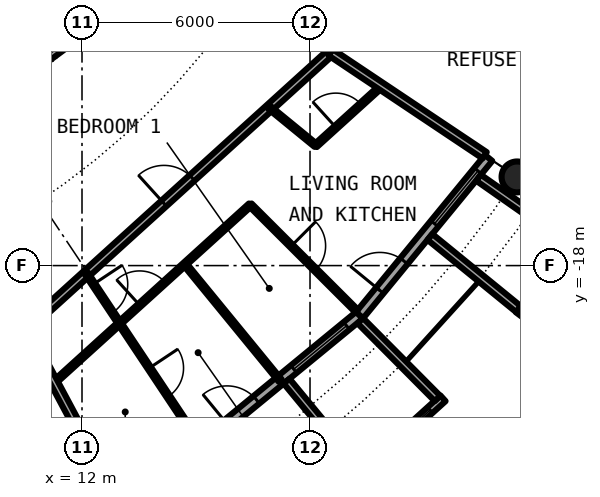
"""IFC4 building model, lengths in metres.
Left out: names, types, materials, properties, quantities, classifications, styles, units other than length and angle.
Written with IfcOpenShell. Run it as: python <this file> out.ifc"""

import sys

from ifc_helpers import new_model, si_unit, direction, frame, frame_2d, origin, origin_2d, place, context, subcontext, project, spatial, rectangle, circle, hollow_circle, extrude, element, fill, save


model = new_model("IFC4")
c1 = context("Model", 3, precision=1e-05, world=origin(), true_north=direction((0.0, 1.0)))
c2 = subcontext(c1, "Body", "Model", "MODEL_VIEW")
j1 = project(units=[si_unit("LENGTHUNIT", "METRE"), si_unit("PLANEANGLEUNIT", "RADIAN")], contexts=[c1])
p1 = place(None, origin())
s1 = spatial("IfcSite", under=j1, at=p1, CompositionType="ELEMENT")
p2 = place(p1, origin())
s2 = spatial("IfcBuilding", under=s1, at=p2, CompositionType="ELEMENT")
p3 = place(p2, frame((0.0, 0.0, 190.2)))
s3 = spatial("IfcBuildingStorey", under=s2, at=p3, CompositionType="ELEMENT", Elevation=190.2)
p4 = place(p3, frame((23.448, -15.667, 0.0), z_axis=(0.0, 0.0, 1.0), x_axis=(1.0, 0.0, 0.0)))
e1 = element("IfcColumn", 1, at=p4, inside=s3, PredefinedType="COLUMN", context=c2, shape_type="SweptSolid", body=[
    extrude(hollow_circle(Radius=0.406, WallThickness=0.03, at=origin_2d()), origin(), (0.0, 0.0, 1.0), 3.05),
])
p5 = place(p3, frame((15.167, -22.699, 0.0), z_axis=(0.0, 0.0, 1.0), x_axis=(0.773019449054, 0.634382322723, 0.0)))
e2 = element("IfcWall", 2, at=p5, inside=s3, PredefinedType="SOLIDWALL", context=c2, shape_type="SweptSolid", body=[
    extrude(rectangle(XDim=5.352, YDim=0.25, at=frame_2d((2.676, 0.0))), origin(), (0.0, 0.0, 1.0), 2.7),
])
p6 = place(p5, frame((0.841, 0.0, 0.0)))
e3 = element("IfcOpeningElement", 3, at=p6, cuts=e2, PredefinedType="OPENING", context=c2, shape_type="SweptSolid", body=[
    extrude(rectangle(XDim=1.0, YDim=2.2, at=frame_2d((0.5, 1.1))), frame((0.0, 0.135, 0.0), z_axis=(0.0, -1.0, 0.0), x_axis=(1.0, 0.0, 0.0)), (0.0, 0.0, 1.0), 0.27),
])
p7 = place(p5, frame((3.111, 0.0, 0.3)))
e4 = element("IfcOpeningElement", 4, at=p7, cuts=e2, PredefinedType="OPENING", context=c2, shape_type="SweptSolid", body=[
    extrude(rectangle(XDim=1.8, YDim=2.1, at=frame_2d((0.9, 1.05))), frame((0.0, 0.135, 0.0), z_axis=(0.0, -1.0, 0.0), x_axis=(1.0, 0.0, 0.0)), (0.0, 0.0, 1.0), 0.27),
])
p8 = place(p3, frame((19.282, -23.503, -0.03), z_axis=(0.0, 0.0, 1.0), x_axis=(0.740998365753, 0.671506829416, 0.0)))
e5 = element("IfcWall", 5, at=p8, inside=s3, PredefinedType="SOLIDWALL", context=c2, shape_type="SweptSolid", body=[
    extrude(rectangle(XDim=2.993, YDim=0.2, at=frame_2d((1.497, 0.0))), origin(), (0.0, 0.0, 1.0), 2.73),
])
p9 = place(p8, frame((0.457, 0.0, 0.33)))
e6 = element("IfcOpeningElement", 6, at=p9, cuts=e5, PredefinedType="OPENING", context=c2, shape_type="SweptSolid", body=[
    extrude(circle(Radius=1.04, at=frame_2d((1.04, 1.04))), frame((0.0, 0.11, 0.0), z_axis=(0.0, -1.0, 0.0), x_axis=(1.0, 0.0, 0.0)), (0.0, 0.0, 1.0), 0.22),
])
p10 = place(p3, frame((17.384, -21.041, -0.03), z_axis=(0.0, 0.0, 1.0), x_axis=(0.63709551667, -0.770784861449, 0.0)))
e7 = element("IfcWall", 7, at=p10, inside=s3, PredefinedType="SOLIDWALL", context=c2, shape_type="SweptSolid", body=[
    extrude(rectangle(XDim=3.006, YDim=0.2, at=frame_2d((1.503, 0.0))), origin(), (0.0, 0.0, 1.0), 2.73),
])
p11 = place(p3, frame((19.323, -19.45, -0.03), z_axis=(0.0, 0.0, 1.0), x_axis=(0.704476739375, -0.709727076896, 0.0)))
e8 = element("IfcWall", 8, at=p11, inside=s3, PredefinedType="SOLIDWALL", context=c2, shape_type="SweptSolid", body=[
    extrude(rectangle(XDim=2.883, YDim=0.2, at=frame_2d((1.441, 0.0))), origin(), (0.0, 0.0, 1.0), 2.73),
])
p12 = place(p3, frame((19.304, -19.304, 0.0), z_axis=(0.0, 0.0, 1.0), x_axis=(0.634382322723, 0.773019449054, 0.0)))
e9 = element("IfcWall", 9, at=p12, inside=s3, PredefinedType="SOLIDWALL", context=c2, shape_type="SweptSolid", body=[
    extrude(rectangle(XDim=5.352, YDim=0.25, at=frame_2d((2.676, 0.0))), origin(), (0.0, 0.0, 1.0), 2.7),
])
p13 = place(p12, frame((0.841, 0.0, 0.0)))
e10 = element("IfcOpeningElement", 10, at=p13, cuts=e9, PredefinedType="OPENING", context=c2, shape_type="SweptSolid", body=[
    extrude(rectangle(XDim=1.0, YDim=2.2, at=frame_2d((0.5, 1.1))), frame((0.0, 0.135, 0.0), z_axis=(0.0, -1.0, 0.0), x_axis=(1.0, 0.0, 0.0)), (0.0, 0.0, 1.0), 0.27),
])
p14 = place(p12, frame((3.111, 0.0, 0.3)))
e11 = element("IfcOpeningElement", 11, at=p14, cuts=e9, PredefinedType="OPENING", context=c2, shape_type="SweptSolid", body=[
    extrude(rectangle(XDim=1.8, YDim=2.1, at=frame_2d((0.9, 1.05))), frame((0.0, 0.135, 0.0), z_axis=(0.0, -1.0, 0.0), x_axis=(1.0, 0.0, 0.0)), (0.0, 0.0, 1.0), 0.27),
])
p15 = place(p3, frame((23.497, -19.289, -0.03), z_axis=(0.0, 0.0, 1.0), x_axis=(0.602806268067, 0.797887588059, 0.0)))
e12 = element("IfcWall", 12, at=p15, inside=s3, PredefinedType="SOLIDWALL", context=c2, shape_type="SweptSolid", body=[
    extrude(rectangle(XDim=2.447, YDim=0.2, at=frame_2d((1.223, 0.0))), origin(), (0.0, 0.0, 1.0), 2.73),
])
p16 = place(p15, frame((0.183, 0.0, 0.33)))
e13 = element("IfcOpeningElement", 13, at=p16, cuts=e12, PredefinedType="OPENING", context=c2, shape_type="SweptSolid", body=[
    extrude(circle(Radius=1.04, at=frame_2d((1.04, 1.04))), frame((0.0, 0.11, 0.0), z_axis=(0.0, -1.0, 0.0), x_axis=(1.0, 0.0, 0.0)), (0.0, 0.0, 1.0), 0.22),
])
p17 = place(p3, frame((21.155, -17.246, -0.03), z_axis=(0.0, 0.0, 1.0), x_axis=(0.775179004516, -0.631741648902, 0.0)))
e14 = element("IfcWall", 14, at=p17, inside=s3, PredefinedType="SOLIDWALL", context=c2, shape_type="SweptSolid", body=[
    extrude(rectangle(XDim=3.006, YDim=0.2, at=frame_2d((1.503, 0.0))), origin(), (0.0, 0.0, 1.0), 2.73),
])
p18 = place(p3, frame((22.433, -15.688, -0.03), z_axis=(0.0, 0.0, 1.0), x_axis=(0.819373043115, -0.573260687834, 0.0)))
e15 = element("IfcWall", 15, at=p18, inside=s3, PredefinedType="SOLIDWALL", context=c2, shape_type="SweptSolid", body=[
    extrude(rectangle(XDim=2.925, YDim=0.2, at=frame_2d((1.463, 0.0))), origin(), (0.0, 0.0, 1.0), 2.73),
])
p19 = place(p3, frame((4.502, -22.773, 0.0), z_axis=(0.0, 0.0, 1.0), x_axis=(0.970080680347, 0.24278277043, 0.0)))
e16 = element("IfcWall", 16, at=p19, inside=s3, PredefinedType="PARTITIONING", context=c2, shape_type="SweptSolid", body=[
    extrude(rectangle(XDim=6.973, YDim=0.1, at=frame_2d((3.486, 0.0))), origin(), (0.0, 0.0, 1.0), 2.7),
])
p20 = place(p19, frame((3.037, 0.0, 0.0)))
e17 = element("IfcOpeningElement", 17, at=p20, cuts=e16, PredefinedType="OPENING", context=c2, shape_type="SweptSolid", body=[
    extrude(rectangle(XDim=0.9, YDim=2.3, at=frame_2d((0.45, 1.15))), frame((0.0, 0.06, 0.0), z_axis=(0.0, -1.0, 0.0), x_axis=(1.0, 0.0, 0.0)), (0.0, 0.0, 1.0), 0.12),
])
p21 = place(p3, frame((11.266, -21.078, 0.0), z_axis=(0.0, 0.0, 1.0), x_axis=(0.741084540886, 0.671411724101, 0.0)))
e18 = element("IfcWall", 18, at=p21, inside=s3, PredefinedType="PARTITIONING", context=c2, shape_type="SweptSolid", body=[
    extrude(rectangle(XDim=6.963, YDim=0.1, at=frame_2d((3.481, 0.0))), origin(), (0.0, 0.0, 1.0), 2.7),
])
p22 = place(p21, frame((3.035, 0.0, 0.0)))
e19 = element("IfcOpeningElement", 19, at=p22, cuts=e18, PredefinedType="OPENING", context=c2, shape_type="SweptSolid", body=[
    extrude(rectangle(XDim=0.9, YDim=2.3, at=frame_2d((0.45, 1.15))), frame((0.0, 0.06, 0.0), z_axis=(0.0, -1.0, 0.0), x_axis=(1.0, 0.0, 0.0)), (0.0, 0.0, 1.0), 0.12),
])
p23 = place(p3, frame((18.147, -14.844, 0.0), z_axis=(0.0, 0.0, 1.0), x_axis=(0.741080073381, 0.671416655169, 0.0)))
e20 = element("IfcWall", 20, at=p23, inside=s3, PredefinedType="PARTITIONING", context=c2, shape_type="SweptSolid", body=[
    extrude(rectangle(XDim=2.323, YDim=0.1, at=frame_2d((1.162, 0.0))), origin(), (0.0, 0.0, 1.0), 2.7),
])
p24 = place(p23, frame((0.718, 0.0, 0.0)))
e21 = element("IfcOpeningElement", 21, at=p24, cuts=e20, PredefinedType="OPENING", context=c2, shape_type="SweptSolid", body=[
    extrude(rectangle(XDim=0.9, YDim=2.3, at=frame_2d((0.45, 1.15))), frame((0.0, 0.06, 0.0), z_axis=(0.0, -1.0, 0.0), x_axis=(1.0, 0.0, 0.0)), (0.0, 0.0, 1.0), 0.12),
])
p25 = place(p3, frame((18.542, -12.389, 0.0), z_axis=(0.0, 0.0, 1.0), x_axis=(0.465359652486, 0.885121683068, 0.0)))
e22 = element("IfcWall", 22, at=p25, inside=s3, PredefinedType="PARTITIONING", context=c2, shape_type="SweptSolid", body=[
    extrude(rectangle(XDim=1.665, YDim=0.2, at=frame_2d((0.833, 0.0))), origin(), (0.0, 0.0, 1.0), 2.7),
])
p26 = place(p3, frame((10.51, -19.669, 0.0), z_axis=(0.0, 0.0, 1.0), x_axis=(0.74093897184, 0.671572363941, 0.0)))
e23 = element("IfcWall", 23, at=p26, inside=s3, PredefinedType="PARTITIONING", context=c2, shape_type="SweptSolid", body=[
    extrude(rectangle(XDim=10.84, YDim=0.2, at=frame_2d((5.42, 0.0))), origin(), (0.0, 0.0, 1.0), 2.7),
])
p27 = place(p26, frame((4.922, 0.0, 0.0)))
e24 = element("IfcOpeningElement", 24, at=p27, cuts=e23, PredefinedType="OPENING", context=c2, shape_type="SweptSolid", body=[
    extrude(rectangle(XDim=1.0, YDim=2.3, at=frame_2d((0.5, 1.15))), frame((0.0, 0.11, 0.0), z_axis=(0.0, -1.0, 0.0), x_axis=(1.0, 0.0, 0.0)), (0.0, 0.0, 1.0), 0.22),
])
p28 = place(p3, frame((5.137, -16.938, 0.0), z_axis=(0.0, 0.0, 1.0), x_axis=(0.803240181354, 0.595655278712, 0.0)))
e25 = element("IfcWall", 25, at=p28, inside=s3, PredefinedType="PARTITIONING", context=c2, shape_type="SweptSolid", body=[
    extrude(rectangle(XDim=11.928, YDim=0.2, at=frame_2d((5.964, 0.0))), origin(), (0.0, 0.0, 1.0), 2.7),
])
p29 = place(p28, frame((4.612, 0.0, 0.0)))
e26 = element("IfcOpeningElement", 26, at=p29, cuts=e25, PredefinedType="OPENING", context=c2, shape_type="SweptSolid", body=[
    extrude(rectangle(XDim=1.0, YDim=2.3, at=frame_2d((0.5, 1.15))), frame((0.0, 0.11, 0.0), z_axis=(0.0, -1.0, 0.0), x_axis=(1.0, 0.0, 0.0)), (0.0, 0.0, 1.0), 0.22),
])
p30 = place(p3, frame((10.512, -19.667, 0.0), z_axis=(0.0, 0.0, 1.0), x_axis=(0.471427642527, -0.881904744211, 0.0)))
e27 = element("IfcWall", 27, at=p30, inside=s3, PredefinedType="PARTITIONING", context=c2, shape_type="SweptSolid", body=[
    extrude(rectangle(XDim=4.875, YDim=0.2, at=frame_2d((2.438, 0.0))), origin(), (0.0, 0.0, 1.0), 2.7),
])
p31 = place(p3, frame((12.118, -18.211, 0.0), z_axis=(0.0, 0.0, 1.0), x_axis=(0.554126060637, -0.832432765407, 0.0)))
e28 = element("IfcWall", 28, at=p31, inside=s3, PredefinedType="PARTITIONING", context=c2, shape_type="SweptSolid", body=[
    extrude(rectangle(XDim=5.3, YDim=0.1, at=frame_2d((2.65, 0.0))), origin(), (0.0, 0.0, 1.0), 2.7),
])
p32 = place(p31, frame((0.335, 0.0, 0.0)))
e29 = element("IfcOpeningElement", 29, at=p32, cuts=e28, PredefinedType="OPENING", context=c2, shape_type="SweptSolid", body=[
    extrude(rectangle(XDim=0.9, YDim=2.3, at=frame_2d((0.45, 1.15))), frame((0.0, 0.06, 0.0), z_axis=(0.0, -1.0, 0.0), x_axis=(1.0, 0.0, 0.0)), (0.0, 0.0, 1.0), 0.12),
])
p33 = place(p31, frame((2.985, 0.0, 0.0)))
e30 = element("IfcOpeningElement", 30, at=p33, cuts=e28, PredefinedType="OPENING", context=c2, shape_type="SweptSolid", body=[
    extrude(rectangle(XDim=0.9, YDim=2.3, at=frame_2d((0.45, 1.15))), frame((0.0, 0.06, 0.0), z_axis=(0.0, -1.0, 0.0), x_axis=(1.0, 0.0, 0.0)), (0.0, 0.0, 1.0), 0.12),
])
p34 = place(p3, frame((14.706, -17.961, 0.0), z_axis=(0.0, 0.0, 1.0), x_axis=(0.633590098448, -0.773668913133, 0.0)))
e31 = element("IfcWall", 31, at=p34, inside=s3, PredefinedType="PARTITIONING", context=c2, shape_type="SweptSolid", body=[
    extrude(rectangle(XDim=3.962, YDim=0.1, at=frame_2d((1.981, 0.0))), origin(), (0.0, 0.0, 1.0), 2.7),
])
p35 = place(p3, frame((16.427, -16.401, 0.0), z_axis=(0.0, 0.0, 1.0), x_axis=(0.707722727509, -0.706490297858, 0.0)))
e32 = element("IfcWall", 32, at=p35, inside=s3, PredefinedType="PARTITIONING", context=c2, shape_type="SweptSolid", body=[
    extrude(rectangle(XDim=3.962, YDim=0.1, at=frame_2d((1.981, 0.0))), origin(), (0.0, 0.0, 1.0), 2.7),
])
p36 = place(p35, frame((1.531, 0.0, 0.0)))
e33 = element("IfcOpeningElement", 33, at=p36, cuts=e32, PredefinedType="OPENING", context=c2, shape_type="SweptSolid", body=[
    extrude(rectangle(XDim=0.9, YDim=2.3, at=frame_2d((0.45, 1.15))), frame((0.0, 0.06, 0.0), z_axis=(0.0, -1.0, 0.0), x_axis=(1.0, 0.0, 0.0)), (0.0, 0.0, 1.0), 0.12),
])
p37 = place(p3, frame((16.936, -13.845, 0.0), z_axis=(0.0, 0.0, 1.0), x_axis=(0.774283039722, -0.632839453889, 0.0)))
e34 = element("IfcWall", 34, at=p37, inside=s3, PredefinedType="PARTITIONING", context=c2, shape_type="SweptSolid", body=[
    extrude(rectangle(XDim=1.569, YDim=0.1, at=frame_2d((0.785, 0.0))), origin(), (0.0, 0.0, 1.0), 2.7),
])
p38 = place(p3, frame((18.542, -12.389, 0.0), z_axis=(0.0, 0.0, 1.0), x_axis=(0.831387096605, -0.55569370664, 0.0)))
e35 = element("IfcWall", 35, at=p38, inside=s3, PredefinedType="PARTITIONING", context=c2, shape_type="SweptSolid", body=[
    extrude(rectangle(XDim=4.875, YDim=0.2, at=frame_2d((2.438, 0.0))), origin(), (0.0, 0.0, 1.0), 2.7),
])
p39 = place(p6, origin())
e36 = element("IfcDoor", 36, at=p39, inside=s3, OperationType="SINGLE_SWING_LEFT", PredefinedType="DOOR", context=c2, shape_type="SweptSolid", body=[
    extrude(rectangle(XDim=1.0, YDim=2.2, at=frame_2d((0.5, 1.1))), frame((0.0, 0.025, 0.0), z_axis=(0.0, -1.0, 0.0), x_axis=(1.0, 0.0, 0.0)), (0.0, 0.0, 1.0), 0.05),
])
fill(e3, e36)
p40 = place(p7, origin())
e37 = element("IfcWindow", 37, at=p40, inside=s3, PartitioningType="SINGLE_PANEL", PredefinedType="WINDOW", context=c2, shape_type="SweptSolid", body=[
    extrude(rectangle(XDim=1.8, YDim=2.1, at=frame_2d((0.9, 1.05))), frame((0.0, 0.03, 0.0), z_axis=(0.0, -1.0, 0.0), x_axis=(1.0, 0.0, 0.0)), (0.0, 0.0, 1.0), 0.06),
])
fill(e4, e37)
p41 = place(p9, origin())
e38 = element("IfcWindow", 38, at=p41, inside=s3, PartitioningType="SINGLE_PANEL", PredefinedType="WINDOW", context=c2, shape_type="SweptSolid", body=[
    extrude(circle(Radius=1.04, at=frame_2d((1.04, 1.04))), frame((0.0, 0.03, 0.0), z_axis=(0.0, -1.0, 0.0), x_axis=(1.0, 0.0, 0.0)), (0.0, 0.0, 1.0), 0.06),
])
fill(e6, e38)
p42 = place(p13, origin())
e39 = element("IfcDoor", 39, at=p42, inside=s3, OperationType="SINGLE_SWING_LEFT", PredefinedType="DOOR", context=c2, shape_type="SweptSolid", body=[
    extrude(rectangle(XDim=1.0, YDim=2.2, at=frame_2d((0.5, 1.1))), frame((0.0, 0.025, 0.0), z_axis=(0.0, -1.0, 0.0), x_axis=(1.0, 0.0, 0.0)), (0.0, 0.0, 1.0), 0.05),
])
fill(e10, e39)
p43 = place(p14, origin())
e40 = element("IfcWindow", 40, at=p43, inside=s3, PartitioningType="SINGLE_PANEL", PredefinedType="WINDOW", context=c2, shape_type="SweptSolid", body=[
    extrude(rectangle(XDim=1.8, YDim=2.1, at=frame_2d((0.9, 1.05))), frame((0.0, 0.03, 0.0), z_axis=(0.0, -1.0, 0.0), x_axis=(1.0, 0.0, 0.0)), (0.0, 0.0, 1.0), 0.06),
])
fill(e11, e40)
p44 = place(p27, origin())
e41 = element("IfcDoor", 41, at=p44, inside=s3, OperationType="SINGLE_SWING_RIGHT", PredefinedType="DOOR", context=c2, shape_type="SweptSolid", body=[
    extrude(rectangle(XDim=1.0, YDim=2.3, at=frame_2d((0.5, 1.15))), frame((0.0, 0.025, 0.0), z_axis=(0.0, -1.0, 0.0), x_axis=(1.0, 0.0, 0.0)), (0.0, 0.0, 1.0), 0.05),
])
fill(e24, e41)
p45 = place(p24, origin())
e42 = element("IfcDoor", 42, at=p45, inside=s3, OperationType="SINGLE_SWING_RIGHT", PredefinedType="DOOR", context=c2, shape_type="SweptSolid", body=[
    extrude(rectangle(XDim=0.9, YDim=2.3, at=frame_2d((0.45, 1.15))), frame((0.0, 0.025, 0.0), z_axis=(0.0, -1.0, 0.0), x_axis=(1.0, 0.0, 0.0)), (0.0, 0.0, 1.0), 0.05),
])
fill(e21, e42)
p46 = place(p32, origin())
e43 = element("IfcDoor", 43, at=p46, inside=s3, OperationType="SINGLE_SWING_LEFT", PredefinedType="DOOR", context=c2, shape_type="SweptSolid", body=[
    extrude(rectangle(XDim=0.9, YDim=2.3, at=frame_2d((0.45, 1.15))), frame((0.0, 0.025, 0.0), z_axis=(0.0, -1.0, 0.0), x_axis=(1.0, 0.0, 0.0)), (0.0, 0.0, 1.0), 0.05),
])
fill(e29, e43)
p47 = place(p36, origin())
e44 = element("IfcDoor", 44, at=p47, inside=s3, OperationType="SINGLE_SWING_RIGHT", PredefinedType="DOOR", context=c2, shape_type="SweptSolid", body=[
    extrude(rectangle(XDim=0.9, YDim=2.3, at=frame_2d((0.45, 1.15))), frame((0.0, 0.025, 0.0), z_axis=(0.0, -1.0, 0.0), x_axis=(1.0, 0.0, 0.0)), (0.0, 0.0, 1.0), 0.05),
])
fill(e33, e44)
p48 = place(p22, origin())
e45 = element("IfcDoor", 45, at=p48, inside=s3, OperationType="SINGLE_SWING_RIGHT", PredefinedType="DOOR", context=c2, shape_type="SweptSolid", body=[
    extrude(rectangle(XDim=0.9, YDim=2.3, at=frame_2d((0.45, 1.15))), frame((0.0, 0.025, 0.0), z_axis=(0.0, -1.0, 0.0), x_axis=(1.0, 0.0, 0.0)), (0.0, 0.0, 1.0), 0.05),
])
fill(e19, e45)
p49 = place(p33, origin())
e46 = element("IfcDoor", 46, at=p49, inside=s3, OperationType="SINGLE_SWING_RIGHT", PredefinedType="DOOR", context=c2, shape_type="SweptSolid", body=[
    extrude(rectangle(XDim=0.9, YDim=2.3, at=frame_2d((0.45, 1.15))), frame((0.0, 0.025, 0.0), z_axis=(0.0, -1.0, 0.0), x_axis=(1.0, 0.0, 0.0)), (0.0, 0.0, 1.0), 0.05),
])
fill(e30, e46)
save(model, sys.argv[1])
